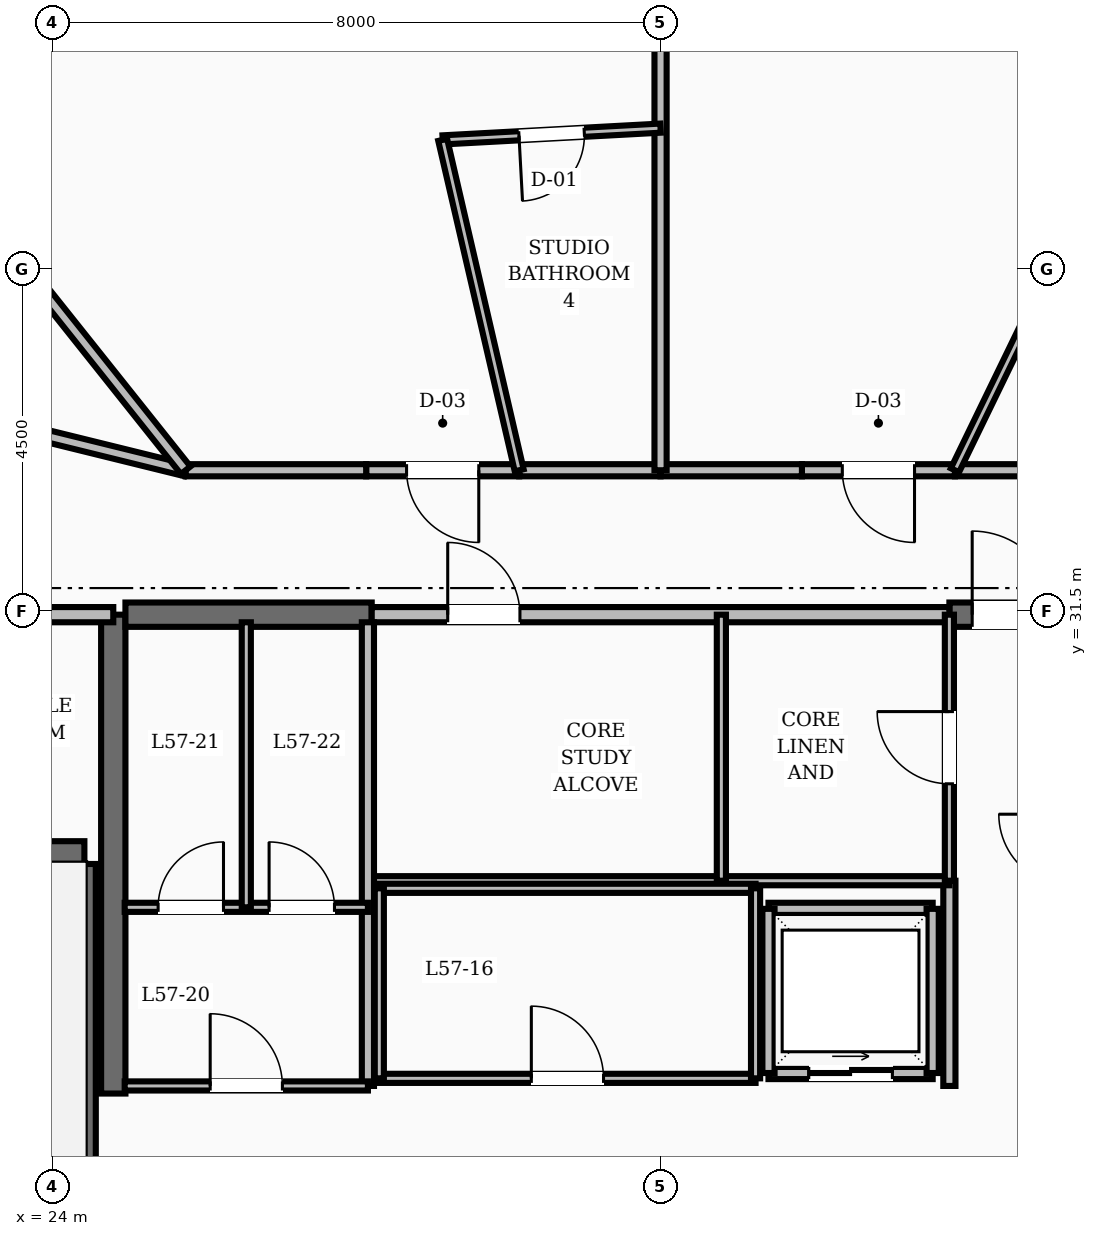
"""IFC4 building model, lengths in metres.
Left out: names, types, materials, properties, quantities, classifications, styles, units other than length and angle.
Written with IfcOpenShell. Run it as: python <this file> out.ifc"""

import sys

from ifc_helpers import new_model, si_unit, direction, frame, frame_2d, origin, place, context, subcontext, project, spatial, rectangle, extrude, element, fill, save


model = new_model("IFC4")
c1 = context("Model", 3, precision=1e-05, world=origin(), true_north=direction((0.0, 1.0)))
c2 = subcontext(c1, "Body", "Model", "MODEL_VIEW")
j1 = project(units=[si_unit("LENGTHUNIT", "METRE"), si_unit("PLANEANGLEUNIT", "RADIAN")], contexts=[c1])
p1 = place(None, origin())
s1 = spatial("IfcSite", under=j1, at=p1, CompositionType="ELEMENT")
p2 = place(p1, origin())
s2 = spatial("IfcBuilding", under=s1, at=p2, CompositionType="ELEMENT")
p3 = place(p2, frame((0.0, 0.0, 222.0)))
s3 = spatial("IfcBuildingStorey", under=s2, at=p3, CompositionType="ELEMENT", Elevation=222.0)
p4 = place(p3, frame((24.8, 25.15, 0.0), z_axis=(0.0, 0.0, 1.0), x_axis=(0.0, 1.0, 0.0)))
e1 = element("IfcWall", 1, at=p4, inside=s3, PredefinedType="SHEAR", context=c2, shape_type="SweptSolid", body=[
    extrude(rectangle(XDim=6.3, YDim=0.32, at=frame_2d((3.15, 0.0))), origin(), (0.0, 0.0, 1.0), 3.6),
])
p5 = place(p3, frame((24.96, 31.45, 0.0), z_axis=(0.0, 0.0, 1.0), x_axis=(1.0, 0.0, 0.0)))
e2 = element("IfcWall", 2, at=p5, inside=s3, PredefinedType="SHEAR", context=c2, shape_type="SweptSolid", body=[
    extrude(rectangle(XDim=3.24, YDim=0.32, at=frame_2d((1.62, 0.0))), origin(), (0.0, 0.0, 1.0), 3.6),
])
p6 = place(p3, frame((35.8, 31.45, 0.0), z_axis=(0.0, 0.0, 1.0), x_axis=(1.0, 0.0, 0.0)))
e3 = element("IfcWall", 3, at=p6, inside=s3, PredefinedType="SHEAR", context=c2, shape_type="SweptSolid", body=[
    extrude(rectangle(XDim=3.24, YDim=0.32, at=frame_2d((1.62, 0.0))), origin(), (0.0, 0.0, 1.0), 3.6),
])
p7 = place(p6, frame((0.3, 0.0, 0.0)))
e4 = element("IfcOpeningElement", 4, at=p7, cuts=e3, PredefinedType="OPENING", context=c2, shape_type="SweptSolid", body=[
    extrude(rectangle(XDim=1.1, YDim=2.1, at=frame_2d((0.55, 1.05))), frame((0.0, 0.17, 0.0), z_axis=(0.0, -1.0, 0.0), x_axis=(1.0, 0.0, 0.0)), (0.0, 0.0, 1.0), 0.34),
])
p8 = place(p3, frame((24.42, 19.43, 0.0), z_axis=(0.0, 0.0, 1.0), x_axis=(0.0, 1.0, 0.0)))
e5 = element("IfcWall", 5, at=p8, inside=s3, PredefinedType="SHEAR", context=c2, shape_type="SweptSolid", body=[
    extrude(rectangle(XDim=8.74, YDim=0.3, at=frame_2d((4.37, 0.0))), origin(), (0.0, 0.0, 1.0), 3.6),
])
p9 = place(p3, frame((20.82, 28.32, 0.0), z_axis=(0.0, 0.0, 1.0), x_axis=(1.0, 0.0, 0.0)))
e6 = element("IfcWall", 6, at=p9, inside=s3, PredefinedType="SHEAR", context=c2, shape_type="SweptSolid", body=[
    extrude(rectangle(XDim=3.6, YDim=0.3, at=frame_2d((1.8, 0.0))), origin(), (0.0, 0.0, 1.0), 3.6),
])
p10 = place(p3, frame((20.82, 31.45, 0.0), z_axis=(0.0, 0.0, 1.0), x_axis=(1.0, 0.0, 0.0)))
e7 = element("IfcWall", 7, at=p10, inside=s3, PredefinedType="SOLIDWALL", context=c2, shape_type="SweptSolid", body=[
    extrude(rectangle(XDim=3.98, YDim=0.2, at=frame_2d((1.99, 0.0))), origin(), (0.0, 0.0, 1.0), 2.87),
])
p11 = place(p3, frame((35.8, 25.25, 0.0), z_axis=(0.0, 0.0, 1.0), x_axis=(0.0, 1.0, 0.0)))
e8 = element("IfcWall", 8, at=p11, inside=s3, PredefinedType="SOLIDWALL", context=c2, shape_type="SweptSolid", body=[
    extrude(rectangle(XDim=2.7, YDim=0.16, at=frame_2d((1.35, 0.0))), origin(), (0.0, 0.0, 1.0), 2.87),
])
p12 = place(p3, frame((33.42, 25.42, 0.0), z_axis=(0.0, 0.0, 1.0), x_axis=(1.0, 0.0, 0.0)))
e9 = element("IfcWall", 9, at=p12, inside=s3, PredefinedType="SOLIDWALL", context=c2, shape_type="SweptSolid", body=[
    extrude(rectangle(XDim=2.16, YDim=0.16, at=frame_2d((1.08, 0.0))), origin(), (0.0, 0.0, 1.0), 2.87),
])
p13 = place(p12, frame((0.53, 0.0, 0.0)))
e10 = element("IfcOpeningElement", 10, at=p13, cuts=e9, PredefinedType="OPENING", context=c2, shape_type="SweptSolid", body=[
    extrude(rectangle(XDim=1.1, YDim=2.15, at=frame_2d((0.55, 1.075))), frame((0.0, 0.09, 0.0), z_axis=(0.0, -1.0, 0.0), x_axis=(1.0, 0.0, 0.0)), (0.0, 0.0, 1.0), 0.18),
])
for number, where, z_axis, x_axis in (
    (11, (33.42, 27.58, 0.0), (0.0, 0.0, 1.0), (1.0, 0.0, 0.0)),
    (12, (33.42, 25.42, 0.0), (0.0, 0.0, 1.0), (0.0, 1.0, 0.0)),
    (13, (35.58, 25.42, 0.0), (0.0, 0.0, 1.0), (0.0, 1.0, 0.0)),
):
    element("IfcWall", number, at=place(p3, frame(where, z_axis=z_axis, x_axis=x_axis)), inside=s3, PredefinedType="SOLIDWALL", context=c2, shape_type="SweptSolid", body=[
        extrude(rectangle(XDim=2.16, YDim=0.16, at=frame_2d((1.08, 0.0))), origin(), (0.0, 0.0, 1.0), 2.87),
    ])
p14 = place(p3, frame((28.2, 31.45, 0.0), z_axis=(0.0, 0.0, 1.0), x_axis=(1.0, 0.0, 0.0)))
e14 = element("IfcWall", 14, at=p14, inside=s3, PredefinedType="SOLIDWALL", context=c2, shape_type="SweptSolid", body=[
    extrude(rectangle(XDim=7.6, YDim=0.2, at=frame_2d((3.8, 0.0))), origin(), (0.0, 0.0, 1.0), 2.87),
])
p15 = place(p14, frame((1.0, 0.0, 0.0)))
e15 = element("IfcOpeningElement", 15, at=p15, cuts=e14, PredefinedType="OPENING", context=c2, shape_type="SweptSolid", body=[
    extrude(rectangle(XDim=0.95, YDim=2.1, at=frame_2d((0.475, 1.05))), frame((0.0, 0.11, 0.0), z_axis=(0.0, -1.0, 0.0), x_axis=(1.0, 0.0, 0.0)), (0.0, 0.0, 1.0), 0.22),
])
p16 = place(p3, frame((28.2, 27.95, 0.0), z_axis=(0.0, 0.0, 1.0), x_axis=(1.0, 0.0, 0.0)))
e16 = element("IfcWall", 16, at=p16, inside=s3, PredefinedType="PARTITIONING", context=c2, shape_type="SweptSolid", body=[
    extrude(rectangle(XDim=7.6, YDim=0.12, at=frame_2d((3.8, 0.0))), origin(), (0.0, 0.0, 1.0), 2.87),
])
p17 = place(p3, frame((35.8, 27.95, 0.0), z_axis=(0.0, 0.0, 1.0), x_axis=(0.0, 1.0, 0.0)))
e17 = element("IfcWall", 17, at=p17, inside=s3, PredefinedType="PARTITIONING", context=c2, shape_type="SweptSolid", body=[
    extrude(rectangle(XDim=3.5, YDim=0.12, at=frame_2d((1.75, 0.0))), origin(), (0.0, 0.0, 1.0), 2.87),
])
p18 = place(p17, frame((1.275, 0.0, 0.0)))
e18 = element("IfcOpeningElement", 18, at=p18, cuts=e17, PredefinedType="OPENING", context=c2, shape_type="SweptSolid", body=[
    extrude(rectangle(XDim=0.95, YDim=2.1, at=frame_2d((0.475, 1.05))), frame((0.0, 0.07, 0.0), z_axis=(0.0, -1.0, 0.0), x_axis=(1.0, 0.0, 0.0)), (0.0, 0.0, 1.0), 0.14),
])
p19 = place(p3, frame((32.8, 27.95, 0.0), z_axis=(0.0, 0.0, 1.0), x_axis=(0.0, 1.0, 0.0)))
e19 = element("IfcWall", 19, at=p19, inside=s3, PredefinedType="PARTITIONING", context=c2, shape_type="SweptSolid", body=[
    extrude(rectangle(XDim=3.5, YDim=0.12, at=frame_2d((1.75, 0.0))), origin(), (0.0, 0.0, 1.0), 2.87),
])
p20 = place(p3, frame((28.3, 25.35, 0.0), z_axis=(0.0, 0.0, 1.0), x_axis=(1.0, 0.0, 0.0)))
e20 = element("IfcWall", 20, at=p20, inside=s3, PredefinedType="PARTITIONING", context=c2, shape_type="SweptSolid", body=[
    extrude(rectangle(XDim=4.95, YDim=0.12, at=frame_2d((2.475, 0.0))), origin(), (0.0, 0.0, 1.0), 2.87),
])
p21 = place(p20, frame((2.0, 0.0, 0.0)))
e21 = element("IfcOpeningElement", 21, at=p21, cuts=e20, PredefinedType="OPENING", context=c2, shape_type="SweptSolid", body=[
    extrude(rectangle(XDim=0.95, YDim=2.1, at=frame_2d((0.475, 1.05))), frame((0.0, 0.07, 0.0), z_axis=(0.0, -1.0, 0.0), x_axis=(1.0, 0.0, 0.0)), (0.0, 0.0, 1.0), 0.14),
])
p22 = place(p3, frame((28.3, 27.85, 0.0), z_axis=(0.0, 0.0, 1.0), x_axis=(1.0, 0.0, 0.0)))
e22 = element("IfcWall", 22, at=p22, inside=s3, PredefinedType="PARTITIONING", context=c2, shape_type="SweptSolid", body=[
    extrude(rectangle(XDim=4.95, YDim=0.12, at=frame_2d((2.475, 0.0))), origin(), (0.0, 0.0, 1.0), 2.87),
])
for number, where, z_axis, x_axis in (
    (23, (28.3, 25.35, 0.0), (0.0, 0.0, 1.0), (0.0, 1.0, 0.0)),
    (24, (33.25, 25.35, 0.0), (0.0, 0.0, 1.0), (0.0, 1.0, 0.0)),
):
    element("IfcWall", number, at=place(p3, frame(where, z_axis=z_axis, x_axis=x_axis)), inside=s3, PredefinedType="PARTITIONING", context=c2, shape_type="SweptSolid", body=[
        extrude(rectangle(XDim=2.5, YDim=0.12, at=frame_2d((1.25, 0.0))), origin(), (0.0, 0.0, 1.0), 2.87),
    ])
p23 = place(p3, frame((28.15, 25.25, 0.0), z_axis=(0.0, 0.0, 1.0), x_axis=(0.0, 1.0, 0.0)))
e25 = element("IfcWall", 25, at=p23, inside=s3, PredefinedType="SOLIDWALL", context=c2, shape_type="SweptSolid", body=[
    extrude(rectangle(XDim=6.1, YDim=0.16, at=frame_2d((3.05, 0.0))), origin(), (0.0, 0.0, 1.0), 2.87),
])
p24 = place(p3, frame((24.95, 25.25, 0.0), z_axis=(0.0, 0.0, 1.0), x_axis=(1.0, 0.0, 0.0)))
e26 = element("IfcWall", 26, at=p24, inside=s3, PredefinedType="PARTITIONING", context=c2, shape_type="SweptSolid", body=[
    extrude(rectangle(XDim=3.2, YDim=0.12, at=frame_2d((1.6, 0.0))), origin(), (0.0, 0.0, 1.0), 2.87),
])
p25 = place(p24, frame((1.125, 0.0, 0.0)))
e27 = element("IfcOpeningElement", 27, at=p25, cuts=e26, PredefinedType="OPENING", context=c2, shape_type="SweptSolid", body=[
    extrude(rectangle(XDim=0.95, YDim=2.1, at=frame_2d((0.475, 1.05))), frame((0.0, 0.07, 0.0), z_axis=(0.0, -1.0, 0.0), x_axis=(1.0, 0.0, 0.0)), (0.0, 0.0, 1.0), 0.14),
])
p26 = place(p3, frame((24.95, 27.6, 0.0), z_axis=(0.0, 0.0, 1.0), x_axis=(1.0, 0.0, 0.0)))
e28 = element("IfcWall", 28, at=p26, inside=s3, PredefinedType="PARTITIONING", context=c2, shape_type="SweptSolid", body=[
    extrude(rectangle(XDim=3.2, YDim=0.12, at=frame_2d((1.6, 0.0))), origin(), (0.0, 0.0, 1.0), 2.87),
])
p27 = place(p26, frame((0.44, 0.0, 0.0)))
e29 = element("IfcOpeningElement", 29, at=p27, cuts=e28, PredefinedType="OPENING", context=c2, shape_type="SweptSolid", body=[
    extrude(rectangle(XDim=0.86, YDim=2.1, at=frame_2d((0.43, 1.05))), frame((0.0, 0.07, 0.0), z_axis=(0.0, -1.0, 0.0), x_axis=(1.0, 0.0, 0.0)), (0.0, 0.0, 1.0), 0.14),
])
p28 = place(p26, frame((1.9, 0.0, 0.0)))
e30 = element("IfcOpeningElement", 30, at=p28, cuts=e28, PredefinedType="OPENING", context=c2, shape_type="SweptSolid", body=[
    extrude(rectangle(XDim=0.86, YDim=2.1, at=frame_2d((0.43, 1.05))), frame((0.0, 0.07, 0.0), z_axis=(0.0, -1.0, 0.0), x_axis=(1.0, 0.0, 0.0)), (0.0, 0.0, 1.0), 0.14),
])
p29 = place(p3, frame((26.55, 27.6, 0.0), z_axis=(0.0, 0.0, 1.0), x_axis=(0.0, 1.0, 0.0)))
e31 = element("IfcWall", 31, at=p29, inside=s3, PredefinedType="PARTITIONING", context=c2, shape_type="SweptSolid", body=[
    extrude(rectangle(XDim=3.75, YDim=0.12, at=frame_2d((1.875, 0.0))), origin(), (0.0, 0.0, 1.0), 2.87),
])
p30 = place(p3, frame((38.248, 33.35, 0.0), z_axis=(0.0, 0.0, 1.0), x_axis=(-1.0, 0.0, 0.0)))
e32 = element("IfcWall", 32, at=p30, inside=s3, PredefinedType="SOLIDWALL", context=c2, shape_type="SweptSolid", body=[
    extrude(rectangle(XDim=2.375, YDim=0.16, at=frame_2d((1.188, 0.0))), origin(), (0.0, 0.0, 1.0), 2.87),
])
p31 = place(p3, frame((35.873, 33.35, 0.0), z_axis=(0.0, 0.0, 1.0), x_axis=(-1.0, 0.0, 0.0)))
e33 = element("IfcWall", 33, at=p31, inside=s3, PredefinedType="SOLIDWALL", context=c2, shape_type="SweptSolid", body=[
    extrude(rectangle(XDim=2.013, YDim=0.16, at=frame_2d((1.006, 0.0))), origin(), (0.0, 0.0, 1.0), 2.87),
])
p32 = place(p31, frame((0.531, 0.0, 0.0)))
e34 = element("IfcOpeningElement", 34, at=p32, cuts=e33, PredefinedType="OPENING", context=c2, shape_type="SweptSolid", body=[
    extrude(rectangle(XDim=0.95, YDim=2.1, at=frame_2d((0.475, 1.05))), frame((0.0, 0.09, 0.0), z_axis=(0.0, -1.0, 0.0), x_axis=(1.0, 0.0, 0.0)), (0.0, 0.0, 1.0), 0.18),
])
for number, where, z_axis, x_axis in (
    (35, (33.86, 33.35, 0.0), (0.0, 0.0, 1.0), (-1.0, 0.0, 0.0)),
    (36, (32.0, 33.35, 0.0), (0.0, 0.0, 1.0), (-1.0, 0.0, 0.0)),
):
    element("IfcWall", number, at=place(p3, frame(where, z_axis=z_axis, x_axis=x_axis)), inside=s3, PredefinedType="SOLIDWALL", context=c2, shape_type="SweptSolid", body=[
        extrude(rectangle(XDim=1.86, YDim=0.16, at=frame_2d((0.93, 0.0))), origin(), (0.0, 0.0, 1.0), 2.87),
    ])
p33 = place(p3, frame((30.14, 33.35, 0.0), z_axis=(0.0, 0.0, 1.0), x_axis=(-1.0, 0.0, 0.0)))
e37 = element("IfcWall", 37, at=p33, inside=s3, PredefinedType="SOLIDWALL", context=c2, shape_type="SweptSolid", body=[
    extrude(rectangle(XDim=2.013, YDim=0.16, at=frame_2d((1.006, 0.0))), origin(), (0.0, 0.0, 1.0), 2.87),
])
p34 = place(p33, frame((0.531, 0.0, 0.0)))
e38 = element("IfcOpeningElement", 38, at=p34, cuts=e37, PredefinedType="OPENING", context=c2, shape_type="SweptSolid", body=[
    extrude(rectangle(XDim=0.95, YDim=2.1, at=frame_2d((0.475, 1.05))), frame((0.0, 0.09, 0.0), z_axis=(0.0, -1.0, 0.0), x_axis=(1.0, 0.0, 0.0)), (0.0, 0.0, 1.0), 0.18),
])
p35 = place(p3, frame((28.127, 33.35, 0.0), z_axis=(0.0, 0.0, 1.0), x_axis=(-1.0, 0.0, 0.0)))
e39 = element("IfcWall", 39, at=p35, inside=s3, PredefinedType="SOLIDWALL", context=c2, shape_type="SweptSolid", body=[
    extrude(rectangle(XDim=2.375, YDim=0.16, at=frame_2d((1.188, 0.0))), origin(), (0.0, 0.0, 1.0), 2.87),
])
p36 = place(p3, frame((25.752, 33.35, 0.0), z_axis=(0.0, 0.0, 1.0), x_axis=(-0.970939799552, 0.239323850978, 0.0)))
e40 = element("IfcWall", 40, at=p36, inside=s3, PredefinedType="SOLIDWALL", context=c2, shape_type="SweptSolid", body=[
    extrude(rectangle(XDim=4.241, YDim=0.16, at=frame_2d((2.12, 0.0))), origin(), (0.0, 0.0, 1.0), 2.87),
])
p37 = place(p3, frame((35.873, 33.35, 0.0), z_axis=(0.0, 0.0, 1.0), x_axis=(0.43692616188, 0.899497375796, 0.0)))
e41 = element("IfcWall", 41, at=p37, inside=s3, PredefinedType="PARTITIONING", context=c2, shape_type="SweptSolid", body=[
    extrude(rectangle(XDim=4.322, YDim=0.12, at=frame_2d((2.161, 0.0))), origin(), (0.0, 0.0, 1.0), 2.87),
])
p38 = place(p3, frame((32.0, 33.35, 0.0), z_axis=(0.0, 0.0, 1.0), x_axis=(0.0, 1.0, 0.0)))
e42 = element("IfcWall", 42, at=p38, inside=s3, PredefinedType="SOLIDWALL", context=c2, shape_type="SweptSolid", body=[
    extrude(rectangle(XDim=11.794, YDim=0.16, at=frame_2d((5.897, 0.0))), origin(), (0.0, 0.0, 1.0), 2.87),
])
p39 = place(p3, frame((32.0, 37.851, 0.0), z_axis=(0.0, 0.0, 1.0), x_axis=(-0.998549327461, -0.053844597009, 0.0)))
e43 = element("IfcWall", 43, at=p39, inside=s3, PredefinedType="PARTITIONING", context=c2, shape_type="SweptSolid", body=[
    extrude(rectangle(XDim=2.87, YDim=0.12, at=frame_2d((1.435, 0.0))), origin(), (0.0, 0.0, 1.0), 2.87),
])
p40 = place(p39, frame((1.005, 0.0, 0.0)))
e44 = element("IfcOpeningElement", 44, at=p40, cuts=e43, PredefinedType="OPENING", context=c2, shape_type="SweptSolid", body=[
    extrude(rectangle(XDim=0.86, YDim=2.1, at=frame_2d((0.43, 1.05))), frame((0.0, 0.07, 0.0), z_axis=(0.0, -1.0, 0.0), x_axis=(1.0, 0.0, 0.0)), (0.0, 0.0, 1.0), 0.14),
])
p41 = place(p3, frame((30.14, 33.35, 0.0), z_axis=(0.0, 0.0, 1.0), x_axis=(-0.225526929879, 0.974236934169, 0.0)))
e45 = element("IfcWall", 45, at=p41, inside=s3, PredefinedType="PARTITIONING", context=c2, shape_type="SweptSolid", body=[
    extrude(rectangle(XDim=4.461, YDim=0.12, at=frame_2d((2.23, 0.0))), origin(), (0.0, 0.0, 1.0), 2.87),
])
p42 = place(p3, frame((25.752, 33.35, 0.0), z_axis=(0.0, 0.0, 1.0), x_axis=(-0.623021929745, 0.782204369112, 0.0)))
e46 = element("IfcWall", 46, at=p42, inside=s3, PredefinedType="SOLIDWALL", context=c2, shape_type="SweptSolid", body=[
    extrude(rectangle(XDim=10.526, YDim=0.16, at=frame_2d((5.263, 0.0))), origin(), (0.0, 0.0, 1.0), 2.87),
])
p43 = place(p7, origin())
e47 = element("IfcDoor", 47, at=p43, inside=s3, OperationType="SINGLE_SWING_LEFT", PredefinedType="DOOR", context=c2, shape_type="SweptSolid", body=[
    extrude(rectangle(XDim=1.1, YDim=2.1, at=frame_2d((0.55, 1.05))), frame((0.0, 0.025, 0.0), z_axis=(0.0, -1.0, 0.0), x_axis=(1.0, 0.0, 0.0)), (0.0, 0.0, 1.0), 0.05),
])
fill(e4, e47)
p44 = place(p13, origin())
e48 = element("IfcDoor", 48, at=p44, inside=s3, OperationType="SLIDING_TO_RIGHT", PredefinedType="DOOR", context=c2, shape_type="SweptSolid", body=[
    extrude(rectangle(XDim=1.1, YDim=2.15, at=frame_2d((0.55, 1.075))), frame((0.0, 0.025, 0.0), z_axis=(0.0, -1.0, 0.0), x_axis=(1.0, 0.0, 0.0)), (0.0, 0.0, 1.0), 0.05),
])
fill(e10, e48)
p45 = place(p15, origin())
e49 = element("IfcDoor", 49, at=p45, inside=s3, OperationType="SINGLE_SWING_LEFT", PredefinedType="DOOR", context=c2, shape_type="SweptSolid", body=[
    extrude(rectangle(XDim=0.95, YDim=2.1, at=frame_2d((0.475, 1.05))), frame((0.0, 0.025, 0.0), z_axis=(0.0, -1.0, 0.0), x_axis=(1.0, 0.0, 0.0)), (0.0, 0.0, 1.0), 0.05),
])
fill(e15, e49)
p46 = place(p18, origin())
e50 = element("IfcDoor", 50, at=p46, inside=s3, OperationType="SINGLE_SWING_RIGHT", PredefinedType="DOOR", context=c2, shape_type="SweptSolid", body=[
    extrude(rectangle(XDim=0.95, YDim=2.1, at=frame_2d((0.475, 1.05))), frame((0.0, 0.025, 0.0), z_axis=(0.0, -1.0, 0.0), x_axis=(1.0, 0.0, 0.0)), (0.0, 0.0, 1.0), 0.05),
])
fill(e18, e50)
p47 = place(p21, origin())
e51 = element("IfcDoor", 51, at=p47, inside=s3, OperationType="SINGLE_SWING_LEFT", PredefinedType="DOOR", context=c2, shape_type="SweptSolid", body=[
    extrude(rectangle(XDim=0.95, YDim=2.1, at=frame_2d((0.475, 1.05))), frame((0.0, 0.025, 0.0), z_axis=(0.0, -1.0, 0.0), x_axis=(1.0, 0.0, 0.0)), (0.0, 0.0, 1.0), 0.05),
])
fill(e21, e51)
p48 = place(p25, origin())
e52 = element("IfcDoor", 52, at=p48, inside=s3, OperationType="SINGLE_SWING_LEFT", PredefinedType="DOOR", context=c2, shape_type="SweptSolid", body=[
    extrude(rectangle(XDim=0.95, YDim=2.1, at=frame_2d((0.475, 1.05))), frame((0.0, 0.025, 0.0), z_axis=(0.0, -1.0, 0.0), x_axis=(1.0, 0.0, 0.0)), (0.0, 0.0, 1.0), 0.05),
])
fill(e27, e52)
p49 = place(p27, origin())
e53 = element("IfcDoor", 53, at=p49, inside=s3, OperationType="SINGLE_SWING_RIGHT", PredefinedType="DOOR", context=c2, shape_type="SweptSolid", body=[
    extrude(rectangle(XDim=0.86, YDim=2.1, at=frame_2d((0.43, 1.05))), frame((0.0, 0.025, 0.0), z_axis=(0.0, -1.0, 0.0), x_axis=(1.0, 0.0, 0.0)), (0.0, 0.0, 1.0), 0.05),
])
fill(e29, e53)
p50 = place(p28, origin())
e54 = element("IfcDoor", 54, at=p50, inside=s3, OperationType="SINGLE_SWING_LEFT", PredefinedType="DOOR", context=c2, shape_type="SweptSolid", body=[
    extrude(rectangle(XDim=0.86, YDim=2.1, at=frame_2d((0.43, 1.05))), frame((0.0, 0.025, 0.0), z_axis=(0.0, -1.0, 0.0), x_axis=(1.0, 0.0, 0.0)), (0.0, 0.0, 1.0), 0.05),
])
fill(e30, e54)
p51 = place(p32, origin())
e55 = element("IfcDoor", 55, at=p51, inside=s3, OperationType="SINGLE_SWING_LEFT", PredefinedType="DOOR", context=c2, shape_type="SweptSolid", body=[
    extrude(rectangle(XDim=0.95, YDim=2.1, at=frame_2d((0.475, 1.05))), frame((0.0, 0.025, 0.0), z_axis=(0.0, -1.0, 0.0), x_axis=(1.0, 0.0, 0.0)), (0.0, 0.0, 1.0), 0.05),
])
fill(e34, e55)
p52 = place(p40, origin())
e56 = element("IfcDoor", 56, at=p52, inside=s3, OperationType="SINGLE_SWING_RIGHT", PredefinedType="DOOR", context=c2, shape_type="SweptSolid", body=[
    extrude(rectangle(XDim=0.86, YDim=2.1, at=frame_2d((0.43, 1.05))), frame((0.0, 0.025, 0.0), z_axis=(0.0, -1.0, 0.0), x_axis=(1.0, 0.0, 0.0)), (0.0, 0.0, 1.0), 0.05),
])
fill(e44, e56)
p53 = place(p34, origin())
e57 = element("IfcDoor", 57, at=p53, inside=s3, OperationType="SINGLE_SWING_LEFT", PredefinedType="DOOR", context=c2, shape_type="SweptSolid", body=[
    extrude(rectangle(XDim=0.95, YDim=2.1, at=frame_2d((0.475, 1.05))), frame((0.0, 0.025, 0.0), z_axis=(0.0, -1.0, 0.0), x_axis=(1.0, 0.0, 0.0)), (0.0, 0.0, 1.0), 0.05),
])
fill(e38, e57)
save(model, sys.argv[1])
